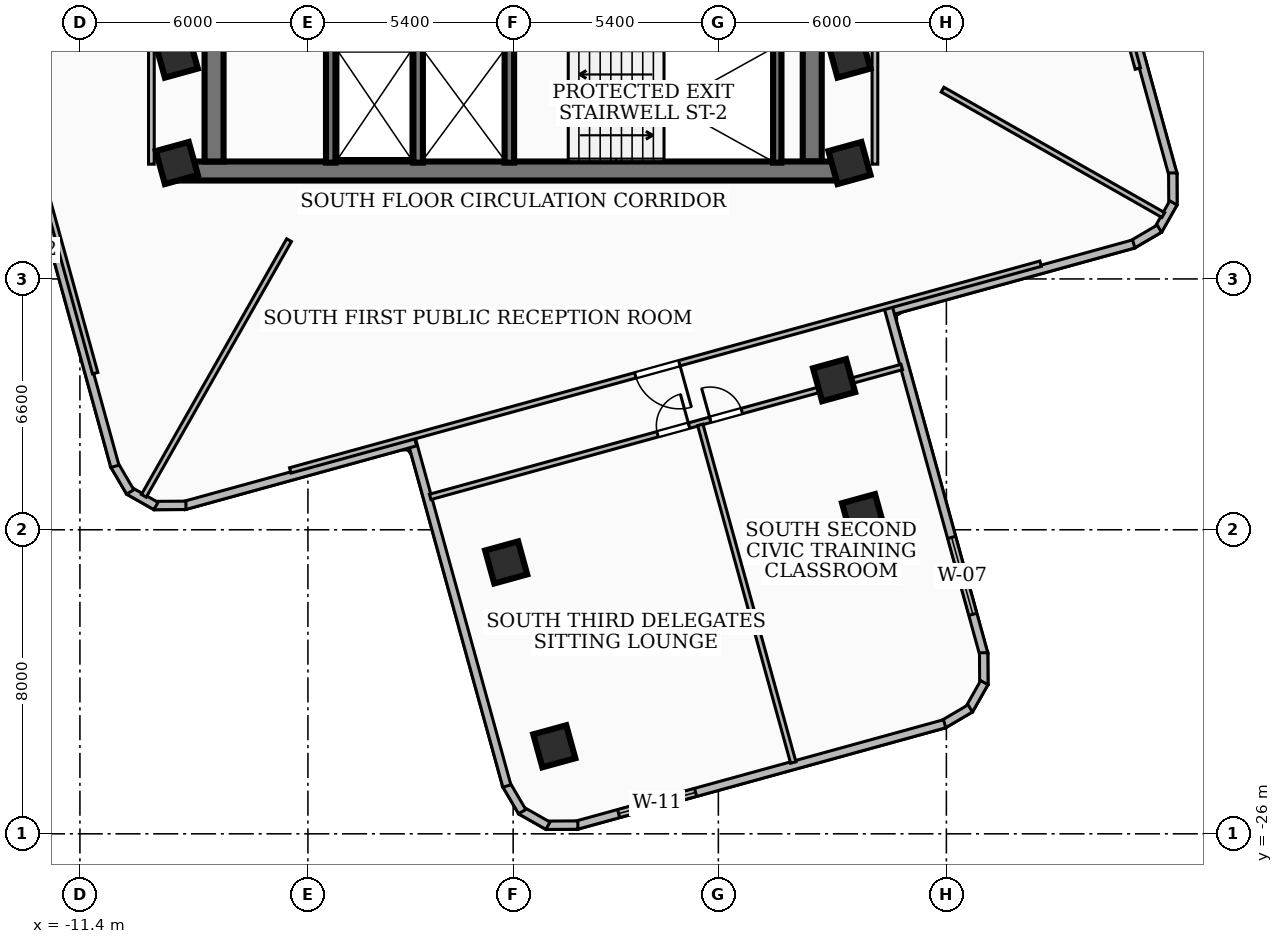
"""IFC4 building model, lengths in metres.
Left out: names, types, materials, properties, quantities, classifications, styles, units other than length and angle.
Written with IfcOpenShell. Run it as: python <this file> out.ifc"""

import sys

from ifc_helpers import new_model, si_unit, direction, frame, frame_2d, origin, origin_2d, place, context, subcontext, project, spatial, rectangle, extrude, element, fill, save


model = new_model("IFC4")
c1 = context("Model", 3, precision=1e-05, world=origin(), true_north=direction((0.0, 1.0)))
c2 = subcontext(c1, "Body", "Model", "MODEL_VIEW")
j1 = project(units=[si_unit("LENGTHUNIT", "METRE"), si_unit("PLANEANGLEUNIT", "RADIAN")], contexts=[c1])
p1 = place(None, origin())
s1 = spatial("IfcSite", under=j1, at=p1, CompositionType="ELEMENT")
p2 = place(p1, origin())
s2 = spatial("IfcBuilding", under=s1, at=p2, CompositionType="ELEMENT")
p3 = place(p2, frame((0.0, 0.0, 134.28)))
s3 = spatial("IfcBuildingStorey", under=s2, at=p3, CompositionType="ELEMENT", Elevation=134.28)
p4 = place(p3, frame((8.78, -8.56, 0.0), z_axis=(0.0, 0.0, 1.0), x_axis=(-1.0, 0.0, 0.0)))
e1 = element("IfcWall", 1, at=p4, inside=s3, PredefinedType="SHEAR", context=c2, shape_type="SweptSolid", body=[
    extrude(rectangle(XDim=17.56, YDim=0.5, at=frame_2d((8.78, 0.0))), origin(), (0.0, 0.0, 1.0), 3.32),
])
for number, where, z_axis, x_axis in (
    (2, (-7.87, -8.31, 0.0), (0.0, 0.0, 1.0), (0.0, 1.0, 0.0)),
    (3, (7.87, -2.0, 0.0), (0.0, 0.0, 1.0), (0.0, -1.0, 0.0)),
):
    element("IfcWall", number, at=place(p3, frame(where, z_axis=z_axis, x_axis=x_axis)), inside=s3, PredefinedType="SHEAR", context=c2, shape_type="SweptSolid", body=[
        extrude(rectangle(XDim=6.31, YDim=0.5, at=frame_2d((3.155, 0.0))), origin(), (0.0, 0.0, 1.0), 3.32),
    ])
p5 = place(p3, frame((6.95, -8.34, 0.0), z_axis=(0.0, 0.0, 1.0), x_axis=(0.0, 1.0, 0.0)))
e4 = element("IfcWall", 4, at=p5, inside=s3, PredefinedType="SOLIDWALL", context=c2, shape_type="SweptSolid", body=[
    extrude(rectangle(XDim=3.06, YDim=0.22, at=frame_2d((1.53, 0.0))), origin(), (0.0, 0.0, 1.0), 3.32),
])
for number, where, z_axis, x_axis in (
    (5, (-0.1, -8.34, 0.0), (0.0, 0.0, 1.0), (0.0, 1.0, 0.0)),
    (6, (-2.5, -8.34, 0.0), (0.0, 0.0, 1.0), (0.0, 1.0, 0.0)),
    (7, (-4.8, -8.34, 0.0), (0.0, 0.0, 1.0), (0.0, 1.0, 0.0)),
):
    element("IfcWall", number, at=place(p3, frame(where, z_axis=z_axis, x_axis=x_axis)), inside=s3, PredefinedType="SOLIDWALL", context=c2, shape_type="SweptSolid", body=[
        extrude(rectangle(XDim=3.04, YDim=0.25, at=frame_2d((1.52, 0.0))), origin(), (0.0, 0.0, 1.0), 3.32),
    ])
for number, where, z_axis, x_axis in (
    (8, (-8.85, -5.55, 0.0), (0.0, 0.0, 1.0), (0.964, 0.266, 0.0)),
    (9, (8.85, -5.55, 0.0), (0.0, 0.0, 1.0), (0.964, 0.266, 0.0)),
    (10, (8.85, -8.35, 0.0), (0.0, 0.0, 1.0), (0.964, 0.266, 0.0)),
    (11, (-8.85, -8.35, 0.0), (0.0, 0.0, 1.0), (0.964, 0.266, 0.0)),
    (12, (-0.183, -18.86, 0.0), (0.0, 0.0, 1.0), (0.964, 0.266, 0.0)),
    (13, (8.445, -14.064, 0.0), (0.0, 0.0, 1.0), (0.964, 0.266, 0.0)),
    (14, (1.083, -23.697, 0.0), (0.0, 0.0, 1.0), (0.964, 0.266, 0.0)),
    (15, (9.208, -17.615, 0.0), (0.0, 0.0, 1.0), (0.964, 0.266, 0.0)),
):
    element("IfcColumn", number, at=place(p3, frame(where, z_axis=z_axis, x_axis=x_axis)), inside=s3, PredefinedType="COLUMN", context=c2, shape_type="SweptSolid", body=[
        extrude(rectangle(XDim=0.9, YDim=0.9, at=origin_2d()), origin(), (0.0, 0.0, 1.0), 3.6),
    ])
p6 = place(p3, frame((-12.166, -9.876, 0.0), z_axis=(0.0, 0.0, 1.0), x_axis=(-0.964099811745, -0.2655401156, 0.0)))
e16 = element("IfcWall", 16, at=p6, inside=s3, PredefinedType="SOLIDWALL", context=c2, shape_type="SweptSolid", body=[
    extrude(rectangle(XDim=13.459, YDim=0.22, at=frame_2d((6.729, 0.0))), origin(), (0.0, 0.0, 1.0), 3.32),
])
p7 = place(p6, frame((0.85, 0.0, 0.85)))
e17 = element("IfcOpeningElement", 17, at=p7, cuts=e16, PredefinedType="OPENING", context=c2, shape_type="SweptSolid", body=[
    extrude(rectangle(XDim=2.7, YDim=1.65, at=frame_2d((1.35, 0.825))), frame((0.0, 0.12, 0.0), z_axis=(0.0, -1.0, 0.0), x_axis=(1.0, 0.0, 0.0)), (0.0, 0.0, 1.0), 0.24),
])
p8 = place(p3, frame((15.686, -2.568, 0.0), z_axis=(0.0, 0.0, 1.0), x_axis=(0.265558779784, -0.964094670911, 0.0)))
e18 = element("IfcWall", 18, at=p8, inside=s3, PredefinedType="SOLIDWALL", context=c2, shape_type="SweptSolid", body=[
    extrude(rectangle(XDim=6.319, YDim=0.22, at=frame_2d((3.159, 0.0))), origin(), (0.0, 0.0, 1.0), 3.32),
])
p9 = place(p3, frame((17.357, -8.611, 0.0), z_axis=(0.0, 0.0, 1.0), x_axis=(0.006140235123, -0.999981148579, 0.0)))
e19 = element("IfcWall", 19, at=p9, inside=s3, PredefinedType="SOLIDWALL", context=c2, shape_type="SweptSolid", body=[
    extrude(rectangle(XDim=0.835, YDim=0.22, at=frame_2d((0.417, 0.0))), origin(), (0.0, 0.0, 1.0), 3.32),
])
p10 = place(p3, frame((17.374, -9.399, 0.0), z_axis=(0.0, 0.0, 1.0), x_axis=(-0.492959963164, -0.87005199541, 0.0)))
e20 = element("IfcWall", 20, at=p10, inside=s3, PredefinedType="SOLIDWALL", context=c2, shape_type="SweptSolid", body=[
    extrude(rectangle(XDim=0.82, YDim=0.22, at=frame_2d((0.41, 0.0))), origin(), (0.0, 0.0, 1.0), 3.32),
])
p11 = place(p3, frame((17.004, -10.077, 0.0), z_axis=(0.0, 0.0, 1.0), x_axis=(-0.862662761192, -0.505779557172, 0.0)))
e21 = element("IfcWall", 21, at=p11, inside=s3, PredefinedType="SOLIDWALL", context=c2, shape_type="SweptSolid", body=[
    extrude(rectangle(XDim=0.834, YDim=0.22, at=frame_2d((0.417, 0.0))), origin(), (0.0, 0.0, 1.0), 3.32),
])
p12 = place(p3, frame((16.33, -10.479, 0.0), z_axis=(0.0, 0.0, 1.0), x_axis=(-0.964092175021, -0.265567840793, 0.0)))
e22 = element("IfcWall", 22, at=p12, inside=s3, PredefinedType="SOLIDWALL", context=c2, shape_type="SweptSolid", body=[
    extrude(rectangle(XDim=6.759, YDim=0.22, at=frame_2d((3.379, 0.0))), origin(), (0.0, 0.0, 1.0), 3.32),
])
p13 = place(p3, frame((9.876, -12.166, 0.0), z_axis=(0.0, 0.0, 1.0), x_axis=(0.265575803102, -0.964089981696, 0.0)))
e23 = element("IfcWall", 23, at=p13, inside=s3, PredefinedType="SOLIDWALL", context=c2, shape_type="SweptSolid", body=[
    extrude(rectangle(XDim=9.458, YDim=0.22, at=frame_2d((4.729, 0.0))), origin(), (0.0, 0.0, 1.0), 3.32),
])
p14 = place(p13, frame((6.259, 0.0, 0.85)))
e24 = element("IfcOpeningElement", 24, at=p14, cuts=e23, PredefinedType="OPENING", context=c2, shape_type="SweptSolid", body=[
    extrude(rectangle(XDim=2.1, YDim=1.8, at=frame_2d((1.05, 0.9))), frame((0.0, 0.12, 0.0), z_axis=(0.0, -1.0, 0.0), x_axis=(1.0, 0.0, 0.0)), (0.0, 0.0, 1.0), 0.24),
])
p15 = place(p3, frame((12.381, -21.236, 0.0), z_axis=(0.0, 0.0, 1.0), x_axis=(0.005854700592, -0.999982861094, 0.0)))
e25 = element("IfcWall", 25, at=p15, inside=s3, PredefinedType="SOLIDWALL", context=c2, shape_type="SweptSolid", body=[
    extrude(rectangle(XDim=0.834, YDim=0.22, at=frame_2d((0.417, 0.0))), origin(), (0.0, 0.0, 1.0), 3.32),
])
p16 = place(p3, frame((12.398, -22.023, 0.0), z_axis=(0.0, 0.0, 1.0), x_axis=(-0.492959963164, -0.87005199541, 0.0)))
e26 = element("IfcWall", 26, at=p16, inside=s3, PredefinedType="SOLIDWALL", context=c2, shape_type="SweptSolid", body=[
    extrude(rectangle(XDim=0.82, YDim=0.22, at=frame_2d((0.41, 0.0))), origin(), (0.0, 0.0, 1.0), 3.32),
])
p17 = place(p3, frame((12.028, -22.701, 0.0), z_axis=(0.0, 0.0, 1.0), x_axis=(-0.86215208584, -0.506649564178, 0.0)))
e27 = element("IfcWall", 27, at=p17, inside=s3, PredefinedType="SOLIDWALL", context=c2, shape_type="SweptSolid", body=[
    extrude(rectangle(XDim=0.835, YDim=0.22, at=frame_2d((0.417, 0.0))), origin(), (0.0, 0.0, 1.0), 3.32),
])
p18 = place(p3, frame((11.354, -23.104, 0.0), z_axis=(0.0, 0.0, 1.0), x_axis=(-0.964062724545, -0.265674731848, 0.0)))
e28 = element("IfcWall", 28, at=p18, inside=s3, PredefinedType="SOLIDWALL", context=c2, shape_type="SweptSolid", body=[
    extrude(rectangle(XDim=10.062, YDim=0.22, at=frame_2d((5.031, 0.0))), origin(), (0.0, 0.0, 1.0), 3.32),
])
p19 = place(p18, frame((6.798, 0.0, 0.85)))
e29 = element("IfcOpeningElement", 29, at=p19, cuts=e28, PredefinedType="OPENING", context=c2, shape_type="SweptSolid", body=[
    extrude(rectangle(XDim=2.1, YDim=1.6, at=frame_2d((1.05, 0.8))), frame((0.0, 0.12, 0.0), z_axis=(0.0, -1.0, 0.0), x_axis=(1.0, 0.0, 0.0)), (0.0, 0.0, 1.0), 0.24),
])
p20 = place(p3, frame((1.703, -25.77, 0.0), z_axis=(0.0, 0.0, 1.0), x_axis=(-0.999982861094, -0.005854700592, 0.0)))
e30 = element("IfcWall", 30, at=p20, inside=s3, PredefinedType="SOLIDWALL", context=c2, shape_type="SweptSolid", body=[
    extrude(rectangle(XDim=0.834, YDim=0.22, at=frame_2d((0.417, 0.0))), origin(), (0.0, 0.0, 1.0), 3.32),
])
p21 = place(p3, frame((0.916, -25.787, 0.0), z_axis=(0.0, 0.0, 1.0), x_axis=(-0.87005199541, 0.492959963164, 0.0)))
e31 = element("IfcWall", 31, at=p21, inside=s3, PredefinedType="SOLIDWALL", context=c2, shape_type="SweptSolid", body=[
    extrude(rectangle(XDim=0.82, YDim=0.22, at=frame_2d((0.41, 0.0))), origin(), (0.0, 0.0, 1.0), 3.32),
])
p22 = place(p3, frame((0.238, -25.417, 0.0), z_axis=(0.0, 0.0, 1.0), x_axis=(-0.506649564178, 0.86215208584, 0.0)))
e32 = element("IfcWall", 32, at=p22, inside=s3, PredefinedType="SOLIDWALL", context=c2, shape_type="SweptSolid", body=[
    extrude(rectangle(XDim=0.835, YDim=0.22, at=frame_2d((0.417, 0.0))), origin(), (0.0, 0.0, 1.0), 3.32),
])
p23 = place(p3, frame((-0.165, -24.743, 0.0), z_axis=(0.0, 0.0, 1.0), x_axis=(-0.265479834686, 0.964116412771, 0.0)))
e33 = element("IfcWall", 33, at=p23, inside=s3, PredefinedType="SOLIDWALL", context=c2, shape_type="SweptSolid", body=[
    extrude(rectangle(XDim=9.458, YDim=0.22, at=frame_2d((4.729, 0.0))), origin(), (0.0, 0.0, 1.0), 2.55),
])
p24 = place(p3, frame((-2.568, -15.686, 0.0), z_axis=(0.0, 0.0, 1.0), x_axis=(-0.964094670911, -0.265558779784, 0.0)))
e34 = element("IfcWall", 34, at=p24, inside=s3, PredefinedType="SOLIDWALL", context=c2, shape_type="SweptSolid", body=[
    extrude(rectangle(XDim=6.319, YDim=0.22, at=frame_2d((3.159, 0.0))), origin(), (0.0, 0.0, 1.0), 2.55),
])
p25 = place(p3, frame((-8.611, -17.357, 0.0), z_axis=(0.0, 0.0, 1.0), x_axis=(-0.999981148579, -0.006140235123, 0.0)))
e35 = element("IfcWall", 35, at=p25, inside=s3, PredefinedType="SOLIDWALL", context=c2, shape_type="SweptSolid", body=[
    extrude(rectangle(XDim=0.835, YDim=0.22, at=frame_2d((0.417, 0.0))), origin(), (0.0, 0.0, 1.0), 3.32),
])
p26 = place(p3, frame((-9.399, -17.374, 0.0), z_axis=(0.0, 0.0, 1.0), x_axis=(-0.87005199541, 0.492959963164, 0.0)))
e36 = element("IfcWall", 36, at=p26, inside=s3, PredefinedType="SOLIDWALL", context=c2, shape_type="SweptSolid", body=[
    extrude(rectangle(XDim=0.82, YDim=0.22, at=frame_2d((0.41, 0.0))), origin(), (0.0, 0.0, 1.0), 3.32),
])
p27 = place(p3, frame((-10.077, -17.004, 0.0), z_axis=(0.0, 0.0, 1.0), x_axis=(-0.505779557172, 0.862662761192, 0.0)))
e37 = element("IfcWall", 37, at=p27, inside=s3, PredefinedType="SOLIDWALL", context=c2, shape_type="SweptSolid", body=[
    extrude(rectangle(XDim=0.834, YDim=0.22, at=frame_2d((0.417, 0.0))), origin(), (0.0, 0.0, 1.0), 3.32),
])
p28 = place(p3, frame((-10.479, -16.33, 0.0), z_axis=(0.0, 0.0, 1.0), x_axis=(-0.265567840793, 0.964092175021, 0.0)))
e38 = element("IfcWall", 38, at=p28, inside=s3, PredefinedType="SOLIDWALL", context=c2, shape_type="SweptSolid", body=[
    extrude(rectangle(XDim=6.759, YDim=0.22, at=frame_2d((3.379, 0.0))), origin(), (0.0, 0.0, 1.0), 3.32),
])
for number, where, z_axis, x_axis in (
    (39, (-9.52, -8.38, 0.0), (0.0, 0.0, 1.0), (0.0, 1.0, 0.0)),
    (40, (9.52, -8.38, 0.0), (0.0, 0.0, 1.0), (0.0, 1.0, 0.0)),
):
    element("IfcWall", number, at=place(p3, frame(where, z_axis=z_axis, x_axis=x_axis)), inside=s3, PredefinedType="PARTITIONING", context=c2, shape_type="SweptSolid", body=[
        extrude(rectangle(XDim=6.63, YDim=0.15, at=frame_2d((3.315, 0.0))), origin(), (0.0, 0.0, 1.0), 2.55),
    ])
p29 = place(p3, frame((-5.897, -10.38, 0.0), z_axis=(0.0, 0.0, 1.0), x_axis=(-0.49389771586, -0.869520009125, 0.0)))
e41 = element("IfcWall", 41, at=p29, inside=s3, PredefinedType="PARTITIONING", context=c2, shape_type="SweptSolid", body=[
    extrude(rectangle(XDim=7.737, YDim=0.145, at=frame_2d((3.868, 0.0))), origin(), (0.0, 0.0, 1.0), 2.55),
])
p30 = place(p3, frame((11.3, -6.419, 0.0), z_axis=(0.0, 0.0, 1.0), x_axis=(0.869475469758, -0.493976120363, 0.0)))
e42 = element("IfcWall", 42, at=p30, inside=s3, PredefinedType="PARTITIONING", context=c2, shape_type="SweptSolid", body=[
    extrude(rectangle(XDim=6.679, YDim=0.145, at=frame_2d((3.339, 0.0))), origin(), (0.0, 0.0, 1.0), 3.32),
])
p31 = place(p3, frame((10.999, 13.879, 0.0), z_axis=(0.0, 0.0, 1.0), x_axis=(0.26558288107, -0.964088031915, 0.0)))
e43 = element("IfcWall", 43, at=p31, inside=s3, PredefinedType="PARTITIONING", context=c2, shape_type="SweptSolid", body=[
    extrude(rectangle(XDim=20.479, YDim=0.145, at=frame_2d((10.24, 0.0))), origin(), (0.0, 0.0, 1.0), 2.55),
])
p32 = place(p31, frame((9.86, 0.0, 0.0)))
e44 = element("IfcOpeningElement", 44, at=p32, cuts=e43, PredefinedType="OPENING", context=c2, shape_type="SweptSolid", body=[
    extrude(rectangle(XDim=1.2, YDim=2.1, at=frame_2d((0.6, 1.05))), frame((0.0, 0.083, 0.0), z_axis=(0.0, -1.0, 0.0), x_axis=(1.0, 0.0, 0.0)), (0.0, 0.0, 1.0), 0.165),
])
p33 = place(p3, frame((-10.999, -13.879, 0.0), z_axis=(0.0, 0.0, 1.0), x_axis=(-0.26558288107, 0.964088031915, 0.0)))
e45 = element("IfcWall", 45, at=p33, inside=s3, PredefinedType="PARTITIONING", context=c2, shape_type="SweptSolid", body=[
    extrude(rectangle(XDim=20.479, YDim=0.145, at=frame_2d((10.24, 0.0))), origin(), (0.0, 0.0, 1.0), 2.55),
])
p34 = place(p33, frame((9.86, 0.0, 0.0)))
e46 = element("IfcOpeningElement", 46, at=p34, cuts=e45, PredefinedType="OPENING", context=c2, shape_type="SweptSolid", body=[
    extrude(rectangle(XDim=1.2, YDim=2.1, at=frame_2d((0.6, 1.05))), frame((0.0, 0.083, 0.0), z_axis=(0.0, -1.0, 0.0), x_axis=(1.0, 0.0, 0.0)), (0.0, 0.0, 1.0), 0.165),
])
p35 = place(p3, frame((13.879, -10.999, 0.0), z_axis=(0.0, 0.0, 1.0), x_axis=(-0.964088031915, -0.26558288107, 0.0)))
e47 = element("IfcWall", 47, at=p35, inside=s3, PredefinedType="PARTITIONING", context=c2, shape_type="SweptSolid", body=[
    extrude(rectangle(XDim=20.479, YDim=0.145, at=frame_2d((10.24, 0.0))), origin(), (0.0, 0.0, 1.0), 2.55),
])
p36 = place(p35, frame((9.86, 0.0, 0.0)))
e48 = element("IfcOpeningElement", 48, at=p36, cuts=e47, PredefinedType="OPENING", context=c2, shape_type="SweptSolid", body=[
    extrude(rectangle(XDim=1.2, YDim=2.1, at=frame_2d((0.6, 1.05))), frame((0.0, 0.083, 0.0), z_axis=(0.0, -1.0, 0.0), x_axis=(1.0, 0.0, 0.0)), (0.0, 0.0, 1.0), 0.165),
])
p37 = place(p3, frame((4.924, -15.24, 0.0), z_axis=(0.0, 0.0, 1.0), x_axis=(0.26555117946, -0.96409676438, 0.0)))
e49 = element("IfcWall", 49, at=p37, inside=s3, PredefinedType="PARTITIONING", context=c2, shape_type="SweptSolid", body=[
    extrude(rectangle(XDim=9.215, YDim=0.145, at=frame_2d((4.607, 0.0))), origin(), (0.0, 0.0, 1.0), 2.812),
])
p38 = place(p3, frame((-2.183, -17.135, 0.0), z_axis=(0.0, 0.0, 1.0), x_axis=(0.964091819819, 0.265569130282, 0.0)))
e50 = element("IfcWall", 50, at=p38, inside=s3, PredefinedType="PARTITIONING", context=c2, shape_type="SweptSolid", body=[
    extrude(rectangle(XDim=12.87, YDim=0.145, at=frame_2d((6.435, 0.0))), origin(), (0.0, 0.0, 1.0), 2.55),
])
p39 = place(p38, frame((6.205, 0.0, 0.0)))
e51 = element("IfcOpeningElement", 51, at=p39, cuts=e50, PredefinedType="OPENING", context=c2, shape_type="SweptSolid", body=[
    extrude(rectangle(XDim=0.86, YDim=2.04, at=frame_2d((0.43, 1.02))), frame((0.0, 0.083, 0.0), z_axis=(0.0, -1.0, 0.0), x_axis=(1.0, 0.0, 0.0)), (0.0, 0.0, 1.0), 0.165),
])
p40 = place(p38, frame((7.645, 0.0, 0.0)))
e52 = element("IfcOpeningElement", 52, at=p40, cuts=e50, PredefinedType="OPENING", context=c2, shape_type="SweptSolid", body=[
    extrude(rectangle(XDim=0.86, YDim=2.04, at=frame_2d((0.43, 1.02))), frame((0.0, 0.083, 0.0), z_axis=(0.0, -1.0, 0.0), x_axis=(1.0, 0.0, 0.0)), (0.0, 0.0, 1.0), 0.165),
])
p41 = place(p14, origin())
e53 = element("IfcWindow", 53, at=p41, inside=s3, PartitioningType="SINGLE_PANEL", PredefinedType="WINDOW", context=c2, shape_type="SweptSolid", body=[
    extrude(rectangle(XDim=2.1, YDim=1.8, at=frame_2d((1.05, 0.9))), frame((0.0, 0.03, 0.0), z_axis=(0.0, -1.0, 0.0), x_axis=(1.0, 0.0, 0.0)), (0.0, 0.0, 1.0), 0.06),
])
fill(e24, e53)
p42 = place(p19, origin())
e54 = element("IfcWindow", 54, at=p42, inside=s3, PartitioningType="SINGLE_PANEL", PredefinedType="WINDOW", context=c2, shape_type="SweptSolid", body=[
    extrude(rectangle(XDim=2.1, YDim=1.6, at=frame_2d((1.05, 0.8))), frame((0.0, 0.03, 0.0), z_axis=(0.0, -1.0, 0.0), x_axis=(1.0, 0.0, 0.0)), (0.0, 0.0, 1.0), 0.06),
])
fill(e29, e54)
p43 = place(p36, origin())
e55 = element("IfcDoor", 55, at=p43, inside=s3, OperationType="SINGLE_SWING_LEFT", PredefinedType="DOOR", context=c2, shape_type="SweptSolid", body=[
    extrude(rectangle(XDim=1.2, YDim=2.1, at=frame_2d((0.6, 1.05))), frame((0.0, 0.025, 0.0), z_axis=(0.0, -1.0, 0.0), x_axis=(1.0, 0.0, 0.0)), (0.0, 0.0, 1.0), 0.05),
])
fill(e48, e55)
p44 = place(p39, origin())
e56 = element("IfcDoor", 56, at=p44, inside=s3, OperationType="SINGLE_SWING_RIGHT", PredefinedType="DOOR", context=c2, shape_type="SweptSolid", body=[
    extrude(rectangle(XDim=0.86, YDim=2.04, at=frame_2d((0.43, 1.02))), frame((0.0, 0.025, 0.0), z_axis=(0.0, -1.0, 0.0), x_axis=(1.0, 0.0, 0.0)), (0.0, 0.0, 1.0), 0.05),
])
fill(e51, e56)
p45 = place(p40, origin())
e57 = element("IfcDoor", 57, at=p45, inside=s3, OperationType="SINGLE_SWING_LEFT", PredefinedType="DOOR", context=c2, shape_type="SweptSolid", body=[
    extrude(rectangle(XDim=0.86, YDim=2.04, at=frame_2d((0.43, 1.02))), frame((0.0, 0.025, 0.0), z_axis=(0.0, -1.0, 0.0), x_axis=(1.0, 0.0, 0.0)), (0.0, 0.0, 1.0), 0.05),
])
fill(e52, e57)
save(model, sys.argv[1])
